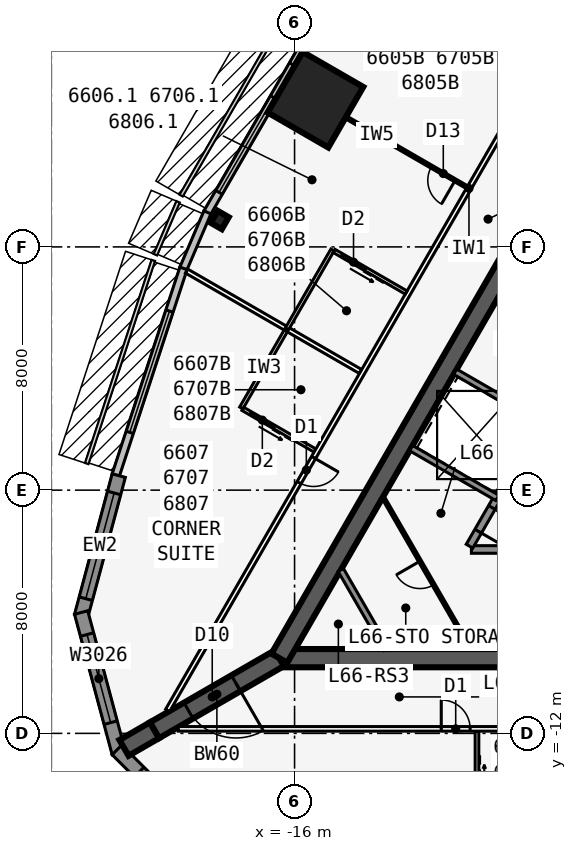
"""IFC4 building model, lengths in metres.
Left out: names, types, materials, properties, quantities, classifications, styles, units other than length and angle.
Written with IfcOpenShell. Run it as: python <this file> out.ifc"""

import sys

from ifc_helpers import new_model, si_unit, direction, frame, frame_2d, origin, origin_2d, place, context, subcontext, project, spatial, polyline, rectangle, i_section, outline, extrude, element, fill, save


model = new_model("IFC4")
c1 = context("Model", 3, precision=1e-05, world=origin(), true_north=direction((0.0, 1.0)))
c2 = subcontext(c1, "Body", "Model", "MODEL_VIEW")
j1 = project(units=[si_unit("LENGTHUNIT", "METRE"), si_unit("PLANEANGLEUNIT", "RADIAN")], contexts=[c1])
p1 = place(None, origin())
s1 = spatial("IfcSite", under=j1, at=p1, CompositionType="ELEMENT")
p2 = place(p1, origin())
s2 = spatial("IfcBuilding", under=s1, at=p2, CompositionType="ELEMENT")
p3 = place(p2, frame((0.0, 0.0, 250.1)))
s3 = spatial("IfcBuildingStorey", under=s2, at=p3, CompositionType="ELEMENT", Elevation=250.1)
p4 = place(p3, frame((-16.5, -9.526, 0.0), z_axis=(0.0, 0.0, 1.0), x_axis=(1.0, 0.0, 0.0)))
e1 = element("IfcWall", 1, at=p4, inside=s3, PredefinedType="SHEAR", context=c2, shape_type="SweptSolid", body=[
    extrude(rectangle(XDim=33.0, YDim=0.6, at=frame_2d((16.5, 0.0))), origin(), (0.0, 0.0, 1.0), 3.6),
])
p5 = place(p4, frame((14.05, 0.0, 0.0)))
e2 = element("IfcOpeningElement", 2, at=p5, cuts=e1, PredefinedType="OPENING", context=c2, shape_type="SweptSolid", body=[
    extrude(rectangle(XDim=1.8, YDim=2.13, at=frame_2d((0.9, 1.065))), frame((0.0, 0.31, 0.0), z_axis=(0.0, -1.0, 0.0), x_axis=(1.0, 0.0, 0.0)), (0.0, 0.0, 1.0), 0.62),
])
p6 = place(p3, frame((-10.183, -5.951, 0.0), z_axis=(0.0, 0.0, 1.0), x_axis=(1.0, 0.0, 0.0)))
e3 = element("IfcWall", 3, at=p6, inside=s3, PredefinedType="SOLIDWALL", context=c2, shape_type="SweptSolid", body=[
    extrude(rectangle(XDim=7.633, YDim=0.25, at=frame_2d((3.816, 0.0))), origin(), (0.0, 0.0, 1.0), 3.435),
])
p7 = place(p3, frame((0.0, 19.052, 0.0), z_axis=(0.0, 0.0, 1.0), x_axis=(-0.499999749417, -0.866025548458, 0.0)))
e4 = element("IfcWall", 4, at=p7, inside=s3, PredefinedType="SHEAR", context=c2, shape_type="SweptSolid", body=[
    extrude(rectangle(XDim=33.0, YDim=0.6, at=frame_2d((16.5, 0.0))), origin(), (0.0, 0.0, 1.0), 3.6),
])
p8 = place(p7, frame((14.15, 0.0, 0.0)))
e5 = element("IfcOpeningElement", 5, at=p8, cuts=e4, PredefinedType="OPENING", context=c2, shape_type="SweptSolid", body=[
    extrude(rectangle(XDim=1.8, YDim=2.13, at=frame_2d((0.9, 1.065))), frame((0.0, 0.31, 0.0), z_axis=(0.0, -1.0, 0.0), x_axis=(1.0, 0.0, 0.0)), (0.0, 0.0, 1.0), 0.62),
])
p9 = place(p7, frame((12.6, 0.0, 0.0)))
e6 = element("IfcOpeningElement", 6, at=p9, cuts=e4, PredefinedType="OPENING", context=c2, shape_type="SweptSolid", body=[
    extrude(rectangle(XDim=1.0, YDim=2.13, at=frame_2d((0.5, 1.065))), frame((0.0, 0.31, 0.0), z_axis=(0.0, -1.0, 0.0), x_axis=(1.0, 0.0, 0.0)), (0.0, 0.0, 1.0), 0.62),
])
p10 = place(p3, frame((-4.929, 3.365, 0.0), z_axis=(0.0, 0.0, 1.0), x_axis=(-0.499991433582, -0.866030349552, 0.0)))
e7 = element("IfcWall", 7, at=p10, inside=s3, PredefinedType="SOLIDWALL", context=c2, shape_type="SweptSolid", body=[
    extrude(rectangle(XDim=10.633, YDim=0.25, at=frame_2d((5.316, 0.0))), origin(), (0.0, 0.0, 1.0), 3.435),
])
p11 = place(p10, frame((9.164, 0.0, 0.0)))
e8 = element("IfcOpeningElement", 8, at=p11, cuts=e7, PredefinedType="OPENING", context=c2, shape_type="SweptSolid", body=[
    extrude(rectangle(XDim=0.9, YDim=2.13, at=frame_2d((0.45, 1.065))), frame((0.0, 0.135, 0.0), z_axis=(0.0, -1.0, 0.0), x_axis=(1.0, 0.0, 0.0)), (0.0, 0.0, 1.0), 0.27),
])
p12 = place(p10, frame((1.1, 0.0, 0.0)))
e9 = element("IfcOpeningElement", 9, at=p12, cuts=e7, PredefinedType="OPENING", context=c2, shape_type="SweptSolid", body=[
    extrude(rectangle(XDim=0.9, YDim=2.13, at=frame_2d((0.45, 1.065))), frame((0.0, 0.135, 0.0), z_axis=(0.0, -1.0, 0.0), x_axis=(1.0, 0.0, 0.0)), (0.0, 0.0, 1.0), 0.27),
])
p13 = place(p10, frame((4.0, 0.0, 0.0)))
e10 = element("IfcOpeningElement", 10, at=p13, cuts=e7, PredefinedType="OPENING", context=c2, shape_type="SweptSolid", body=[
    extrude(rectangle(XDim=0.9, YDim=2.13, at=frame_2d((0.45, 1.065))), frame((0.0, 0.135, 0.0), z_axis=(0.0, -1.0, 0.0), x_axis=(1.0, 0.0, 0.0)), (0.0, 0.0, 1.0), 0.27),
])
for number, where, z_axis, x_axis in (
    (11, (-7.879, -1.744, 0.0), (0.0, 0.0, 1.0), (-0.866, 0.5, 0.0)),
    (12, (-9.329, -4.256, 0.0), (0.0, 0.0, 1.0), (-0.866, 0.5, 0.0)),
):
    element("IfcWall", number, at=place(p3, frame(where, z_axis=z_axis, x_axis=x_axis)), inside=s3, PredefinedType="SOLIDWALL", context=c2, shape_type="SweptSolid", body=[
        extrude(rectangle(XDim=3.275, YDim=0.2, at=frame_2d((1.637, 0.0))), origin(), (0.0, 0.0, 1.0), 3.435),
    ])
p14 = place(p3, frame((-16.5, -9.526, 0.0), z_axis=(0.0, 0.0, 1.0), x_axis=(-0.866031398331, -0.499989616998, 0.0)))
e13 = element("IfcWall", 13, at=p14, inside=s3, PredefinedType="SHEAR", context=c2, shape_type="SweptSolid", body=[
    extrude(rectangle(XDim=4.746, YDim=0.6, at=frame_2d((2.373, 0.0))), origin(), (0.0, 0.0, 1.0), 3.6),
])
p15 = place(p14, frame((1.65, 0.0, 0.0)))
e14 = element("IfcOpeningElement", 14, at=p15, cuts=e13, PredefinedType="OPENING", context=c2, shape_type="SweptSolid", body=[
    extrude(rectangle(XDim=1.8, YDim=2.13, at=frame_2d((0.9, 1.065))), frame((0.0, 0.31, 0.0), z_axis=(0.0, -1.0, 0.0), x_axis=(1.0, 0.0, 0.0)), (0.0, 0.0, 1.0), 0.62),
])
p16 = place(p3, frame((-20.61, -11.899, 0.0), z_axis=(0.0, 0.0, 1.0), x_axis=(-0.866009537788, -0.500027479704, 0.0)))
e15 = element("IfcWall", 15, at=p16, inside=s3, PredefinedType="SHEAR", context=c2, shape_type="SweptSolid", body=[
    extrude(rectangle(XDim=1.155, YDim=0.6, at=frame_2d((0.577, 0.0))), origin(), (0.0, 0.0, 1.0), 3.6),
])
p17 = place(p3, frame((-18.461, 4.885, 0.0), z_axis=(0.0, 0.0, 1.0), x_axis=(-0.866025403784, 0.5, 0.0)))
e16 = element("IfcColumn", 16, at=p17, inside=s3, PredefinedType="COLUMN", context=c2, shape_type="SweptSolid", body=[
    extrude(i_section(OverallWidth=0.419, OverallDepth=0.455, WebThickness=0.042, FlangeThickness=0.068, at=origin_2d()), origin(), (0.0, 0.0, 1.0), 3.6),
])
p18 = place(p3, frame((-15.312, 8.84, 0.0), z_axis=(0.0, 0.0, 1.0), x_axis=(-0.866025403784, 0.5, 0.0)))
e17 = element("IfcColumn", 17, at=p18, inside=s3, PredefinedType="COLUMN", context=c2, shape_type="SweptSolid", body=[
    extrude(rectangle(XDim=2.3, YDim=2.3, at=origin_2d()), origin(), (0.0, 0.0, 1.0), 3.6),
])
p19 = place(p3, frame((-13.873, 13.783, 0.0), z_axis=(0.0, 0.0, 1.0), x_axis=(-0.499993662806, -0.866029062534, 0.0)))
e18 = element("IfcWall", 18, at=p19, inside=s3, PredefinedType="STANDARD", context=c2, shape_type="SweptSolid", body=[
    extrude(rectangle(XDim=10.0, YDim=0.25, at=frame_2d((5.0, 0.0))), origin(), (0.0, 0.0, 1.0), 3.435),
])
p20 = place(p19, frame((0.775, 0.0, 0.45)))
e19 = element("IfcOpeningElement", 19, at=p20, cuts=e18, PredefinedType="OPENING", context=c2, shape_type="SweptSolid", body=[
    extrude(rectangle(XDim=3.6, YDim=2.6, at=frame_2d((1.8, 1.3))), frame((0.0, 0.135, 0.0), z_axis=(0.0, -1.0, 0.0), x_axis=(1.0, 0.0, 0.0)), (0.0, 0.0, 1.0), 0.27),
])
p21 = place(p19, frame((5.625, 0.0, 0.45)))
e20 = element("IfcOpeningElement", 20, at=p21, cuts=e18, PredefinedType="OPENING", context=c2, shape_type="SweptSolid", body=[
    extrude(rectangle(XDim=3.6, YDim=2.6, at=frame_2d((1.8, 1.3))), frame((0.0, 0.135, 0.0), z_axis=(0.0, -1.0, 0.0), x_axis=(1.0, 0.0, 0.0)), (0.0, 0.0, 1.0), 0.27),
])
p22 = place(p3, frame((-18.866, 5.136, 0.0), z_axis=(0.0, 0.0, 1.0), x_axis=(-0.393290226175, -0.91941437774, 0.0)))
e21 = element("IfcWall", 21, at=p22, inside=s3, PredefinedType="STANDARD", context=c2, shape_type="SweptSolid", body=[
    extrude(rectangle(XDim=2.014, YDim=0.25, at=frame_2d((1.007, 0.0))), origin(), (0.0, 0.0, 1.0), 3.435),
])
p23 = place(p3, frame((-19.654, 3.294, 0.0), z_axis=(0.0, 0.0, 1.0), x_axis=(-0.311328857048, -0.95030223759, 0.0)))
e22 = element("IfcWall", 22, at=p23, inside=s3, PredefinedType="STANDARD", context=c2, shape_type="SweptSolid", body=[
    extrude(rectangle(XDim=7.153, YDim=0.25, at=frame_2d((3.576, 0.0))), origin(), (0.0, 0.0, 1.0), 3.435),
])
p24 = place(p23, frame((1.476, 0.0, 0.45)))
e23 = element("IfcOpeningElement", 23, at=p24, cuts=e22, PredefinedType="OPENING", context=c2, shape_type="SweptSolid", body=[
    extrude(rectangle(XDim=4.2, YDim=2.6, at=frame_2d((2.1, 1.3))), frame((0.0, 0.135, 0.0), z_axis=(0.0, -1.0, 0.0), x_axis=(1.0, 0.0, 0.0)), (0.0, 0.0, 1.0), 0.27),
])
p25 = place(p3, frame((-21.783, -3.522, 0.0), z_axis=(0.0, 0.0, 1.0), x_axis=(-0.25880328844, -0.965930048136, 0.0)))
e24 = element("IfcWall", 24, at=p25, inside=s3, PredefinedType="SOLIDWALL", context=c2, shape_type="SweptSolid", body=[
    extrude(rectangle(XDim=4.782, YDim=0.45, at=frame_2d((2.391, 0.0))), origin(), (0.0, 0.0, 1.0), 3.435),
])
p26 = place(p25, frame((0.591, 0.0, 0.45)))
e25 = element("IfcOpeningElement", 25, at=p26, cuts=e24, PredefinedType="OPENING", context=c2, shape_type="SweptSolid", body=[
    extrude(rectangle(XDim=3.6, YDim=2.6, at=frame_2d((1.8, 1.3))), frame((0.0, 0.235, 0.0), z_axis=(0.0, -1.0, 0.0), x_axis=(1.0, 0.0, 0.0)), (0.0, 0.0, 1.0), 0.47),
])
p27 = place(p3, frame((-23.02, -8.025, 0.0), z_axis=(0.0, 0.0, 1.0), x_axis=(0.25880328844, -0.965930048136, 0.0)))
e26 = element("IfcWall", 26, at=p27, inside=s3, PredefinedType="SOLIDWALL", context=c2, shape_type="SweptSolid", body=[
    extrude(outline(polyline([(4.782, 0.225), (4.722, 0.225), (4.375, 0.132), (4.351, 0.225), (0.0, 0.225), (0.0, -0.225), (4.782, -0.225), (4.782, 0.225)])), origin(), (0.0, 0.0, 1.0), 3.435),
])
p28 = place(p27, frame((0.75, 0.0, 0.45)))
e27 = element("IfcOpeningElement", 27, at=p28, cuts=e26, PredefinedType="OPENING", context=c2, shape_type="SweptSolid", body=[
    extrude(rectangle(XDim=3.0, YDim=2.6, at=frame_2d((1.5, 1.3))), frame((0.0, 0.235, 0.0), z_axis=(0.0, -1.0, 0.0), x_axis=(1.0, 0.0, 0.0)), (0.0, 0.0, 1.0), 0.47),
])
p29 = place(p3, frame((-21.841, -12.542, 0.0), z_axis=(0.0, 0.0, 1.0), x_axis=(0.707081252484, -0.707132308968, 0.0)))
e28 = element("IfcWall", 28, at=p29, inside=s3, PredefinedType="SOLIDWALL", context=c2, shape_type="SweptSolid", body=[
    extrude(outline(polyline([(4.782, 0.225), (0.431, 0.225), (0.406, 0.132), (0.059, 0.225), (0.0, 0.225), (0.0, -0.225), (4.782, -0.225), (4.782, 0.225)])), origin(), (0.0, 0.0, 1.0), 3.435),
])
p30 = place(p29, frame((1.031, 0.0, 0.45)))
e29 = element("IfcOpeningElement", 29, at=p30, cuts=e28, PredefinedType="OPENING", context=c2, shape_type="SweptSolid", body=[
    extrude(rectangle(XDim=3.0, YDim=2.6, at=frame_2d((1.5, 1.3))), frame((0.0, 0.235, 0.0), z_axis=(0.0, -1.0, 0.0), x_axis=(1.0, 0.0, 0.0)), (0.0, 0.0, 1.0), 0.47),
])
p31 = place(p3, frame((-19.827, -11.851, 0.0), z_axis=(0.0, 0.0, 1.0), x_axis=(1.0, 0.0, 0.0)))
e30 = element("IfcWall", 30, at=p31, inside=s3, PredefinedType="PARTITIONING", context=c2, shape_type="SweptSolid", body=[
    extrude(rectangle(XDim=12.827, YDim=0.15, at=frame_2d((6.414, 0.0))), origin(), (0.0, 0.0, 1.0), 3.435),
])
p32 = place(p31, frame((8.652, 0.0, 0.0)))
e31 = element("IfcOpeningElement", 31, at=p32, cuts=e30, PredefinedType="OPENING", context=c2, shape_type="SweptSolid", body=[
    extrude(rectangle(XDim=0.95, YDim=2.13, at=frame_2d((0.475, 1.065))), frame((0.0, 0.085, 0.0), z_axis=(0.0, -1.0, 0.0), x_axis=(1.0, 0.0, 0.0)), (0.0, 0.0, 1.0), 0.17),
])
p33 = place(p3, frame((-10.0, -11.926, 0.0), z_axis=(0.0, 0.0, 1.0), x_axis=(0.0, -1.0, 0.0)))
e32 = element("IfcWall", 32, at=p33, inside=s3, PredefinedType="PLUMBINGWALL", context=c2, shape_type="SweptSolid", body=[
    extrude(rectangle(XDim=2.74, YDim=0.12, at=frame_2d((1.37, 0.0))), origin(), (0.0, 0.0, 1.0), 3.435),
])
p34 = place(p33, frame((1.55, 0.0, 0.0)))
e33 = element("IfcOpeningElement", 33, at=p34, cuts=e32, PredefinedType="OPENING", context=c2, shape_type="SweptSolid", body=[
    extrude(rectangle(XDim=0.9, YDim=2.13, at=frame_2d((0.45, 1.065))), frame((0.0, 0.07, 0.0), z_axis=(0.0, -1.0, 0.0), x_axis=(1.0, 0.0, 0.0)), (0.0, 0.0, 1.0), 0.14),
])
p35 = place(p3, frame((-0.35, 23.096, 0.0), z_axis=(0.0, 0.0, 1.0), x_axis=(-0.499998875317, -0.866026053119, 0.0)))
e34 = element("IfcWall", 34, at=p35, inside=s3, PredefinedType="PARTITIONING", context=c2, shape_type="SweptSolid", body=[
    extrude(rectangle(XDim=39.654, YDim=0.15, at=frame_2d((19.827, 0.0))), origin(), (0.0, 0.0, 1.0), 3.435),
])
p36 = place(p35, frame((8.652, 0.0, 0.0)))
e35 = element("IfcOpeningElement", 35, at=p36, cuts=e34, PredefinedType="OPENING", context=c2, shape_type="SweptSolid", body=[
    extrude(rectangle(XDim=0.95, YDim=2.13, at=frame_2d((0.475, 1.065))), frame((0.0, 0.085, 0.0), z_axis=(0.0, -1.0, 0.0), x_axis=(1.0, 0.0, 0.0)), (0.0, 0.0, 1.0), 0.17),
])
p37 = place(p35, frame((15.852, 0.0, 0.0)))
e36 = element("IfcOpeningElement", 36, at=p37, cuts=e34, PredefinedType="OPENING", context=c2, shape_type="SweptSolid", body=[
    extrude(rectangle(XDim=0.95, YDim=2.13, at=frame_2d((0.475, 1.065))), frame((0.0, 0.085, 0.0), z_axis=(0.0, -1.0, 0.0), x_axis=(1.0, 0.0, 0.0)), (0.0, 0.0, 1.0), 0.17),
])
p38 = place(p35, frame((30.052, 0.0, 0.0)))
e37 = element("IfcOpeningElement", 37, at=p38, cuts=e34, PredefinedType="OPENING", context=c2, shape_type="SweptSolid", body=[
    extrude(rectangle(XDim=0.95, YDim=2.13, at=frame_2d((0.475, 1.065))), frame((0.0, 0.085, 0.0), z_axis=(0.0, -1.0, 0.0), x_axis=(1.0, 0.0, 0.0)), (0.0, 0.0, 1.0), 0.17),
])
p39 = place(p3, frame((-10.329, 5.963, 0.0), z_axis=(0.0, 0.0, 1.0), x_axis=(-0.866011785882, 0.500023586156, 0.0)))
e38 = element("IfcWall", 38, at=p39, inside=s3, PredefinedType="PARTITIONING", context=c2, shape_type="SweptSolid", body=[
    extrude(rectangle(XDim=6.854, YDim=0.1, at=frame_2d((3.427, 0.0))), origin(), (0.0, 0.0, 1.0), 2.678),
])
p40 = place(p39, frame((0.45, 0.0, 0.0)))
e39 = element("IfcOpeningElement", 39, at=p40, cuts=e38, PredefinedType="OPENING", context=c2, shape_type="SweptSolid", body=[
    extrude(rectangle(XDim=0.9, YDim=2.13, at=frame_2d((0.45, 1.065))), frame((0.0, 0.06, 0.0), z_axis=(0.0, -1.0, 0.0), x_axis=(1.0, 0.0, 0.0)), (0.0, 0.0, 1.0), 0.12),
])
p41 = place(p3, frame((-13.829, -0.099, 0.0), z_axis=(0.0, 0.0, 1.0), x_axis=(-0.866022562216, 0.500004921708, 0.0)))
e40 = element("IfcWall", 40, at=p41, inside=s3, PredefinedType="PARTITIONING", context=c2, shape_type="SweptSolid", body=[
    extrude(rectangle(XDim=6.609, YDim=0.15, at=frame_2d((3.304, 0.0))), origin(), (0.0, 0.0, 1.0), 2.678),
])
p42 = place(p3, frame((-14.753, 3.899, 0.0), z_axis=(0.0, 0.0, 1.0), x_axis=(-0.50002537861, -0.866010750942, 0.0)))
e41 = element("IfcWall", 41, at=p42, inside=s3, PredefinedType="PLUMBINGWALL", context=c2, shape_type="SweptSolid", body=[
    extrude(rectangle(XDim=3.0, YDim=0.12, at=frame_2d((1.5, 0.0))), origin(), (0.0, 0.0, 1.0), 3.435),
])
p43 = place(p3, frame((-12.329, 2.499, 0.0), z_axis=(0.0, 0.0, 1.0), x_axis=(-0.866035715982, 0.499982138324, 0.0)))
e42 = element("IfcWall", 42, at=p43, inside=s3, PredefinedType="PLUMBINGWALL", context=c2, shape_type="SweptSolid", body=[
    extrude(rectangle(XDim=2.74, YDim=0.12, at=frame_2d((1.37, 0.0))), origin(), (0.0, 0.0, 1.0), 3.435),
])
p44 = place(p43, frame((1.55, 0.0, 0.0)))
e43 = element("IfcOpeningElement", 43, at=p44, cuts=e42, PredefinedType="OPENING", context=c2, shape_type="SweptSolid", body=[
    extrude(rectangle(XDim=0.9, YDim=2.13, at=frame_2d((0.45, 1.065))), frame((0.0, 0.07, 0.0), z_axis=(0.0, -1.0, 0.0), x_axis=(1.0, 0.0, 0.0)), (0.0, 0.0, 1.0), 0.14),
])
p45 = place(p3, frame((-16.253, 1.301, 0.0), z_axis=(0.0, 0.0, 1.0), x_axis=(-0.499990139034, -0.866031096941, 0.0)))
e44 = element("IfcWall", 44, at=p45, inside=s3, PredefinedType="PLUMBINGWALL", context=c2, shape_type="SweptSolid", body=[
    extrude(rectangle(XDim=3.0, YDim=0.12, at=frame_2d((1.5, 0.0))), origin(), (0.0, 0.0, 1.0), 3.435),
])
p46 = place(p3, frame((-15.329, -2.697, 0.0), z_axis=(0.0, 0.0, 1.0), x_axis=(-0.866035715982, 0.499982138324, 0.0)))
e45 = element("IfcWall", 45, at=p46, inside=s3, PredefinedType="PLUMBINGWALL", context=c2, shape_type="SweptSolid", body=[
    extrude(rectangle(XDim=2.74, YDim=0.12, at=frame_2d((1.37, 0.0))), origin(), (0.0, 0.0, 1.0), 3.435),
])
p47 = place(p46, frame((1.55, 0.0, 0.0)))
e46 = element("IfcOpeningElement", 46, at=p47, cuts=e45, PredefinedType="OPENING", context=c2, shape_type="SweptSolid", body=[
    extrude(rectangle(XDim=0.9, YDim=2.13, at=frame_2d((0.45, 1.065))), frame((0.0, 0.07, 0.0), z_axis=(0.0, -1.0, 0.0), x_axis=(1.0, 0.0, 0.0)), (0.0, 0.0, 1.0), 0.14),
])
p48 = place(p3, frame((-12.978, -9.226, 0.0), z_axis=(0.0, 0.0, 1.0), x_axis=(-0.499952404951, 0.866052881055, 0.0)))
e47 = element("IfcWall", 47, at=p48, inside=s3, PredefinedType="SOLIDWALL", context=c2, shape_type="SweptSolid", body=[
    extrude(rectangle(XDim=3.002, YDim=0.2, at=frame_2d((1.501, 0.0))), origin(), (0.0, 0.0, 1.0), 3.435),
])
p49 = place(p3, frame((-10.207, -9.226, 0.0), z_axis=(0.0, 0.0, 1.0), x_axis=(-0.500027479704, 0.866009537788, 0.0)))
e48 = element("IfcWall", 48, at=p49, inside=s3, PredefinedType="PARTITIONING", context=c2, shape_type="SweptSolid", body=[
    extrude(rectangle(XDim=5.774, YDim=0.1, at=frame_2d((2.887, 0.0))), origin(), (0.0, 0.0, 1.0), 3.435),
])
p50 = place(p49, frame((2.437, 0.0, 0.0)))
e49 = element("IfcOpeningElement", 49, at=p50, cuts=e48, PredefinedType="OPENING", context=c2, shape_type="SweptSolid", body=[
    extrude(rectangle(XDim=0.9, YDim=2.13, at=frame_2d((0.45, 1.065))), frame((0.0, 0.06, 0.0), z_axis=(0.0, -1.0, 0.0), x_axis=(1.0, 0.0, 0.0)), (0.0, 0.0, 1.0), 0.12),
])
p51 = place(p20, origin())
e50 = element("IfcWindow", 50, at=p51, inside=s3, PartitioningType="SINGLE_PANEL", PredefinedType="WINDOW", context=c2, shape_type="SweptSolid", body=[
    extrude(rectangle(XDim=3.6, YDim=2.6, at=frame_2d((1.8, 1.3))), frame((0.0, 0.03, 0.0), z_axis=(0.0, -1.0, 0.0), x_axis=(1.0, 0.0, 0.0)), (0.0, 0.0, 1.0), 0.06),
])
fill(e19, e50)
p52 = place(p21, origin())
e51 = element("IfcWindow", 51, at=p52, inside=s3, PartitioningType="SINGLE_PANEL", PredefinedType="WINDOW", context=c2, shape_type="SweptSolid", body=[
    extrude(rectangle(XDim=3.6, YDim=2.6, at=frame_2d((1.8, 1.3))), frame((0.0, 0.03, 0.0), z_axis=(0.0, -1.0, 0.0), x_axis=(1.0, 0.0, 0.0)), (0.0, 0.0, 1.0), 0.06),
])
fill(e20, e51)
p53 = place(p24, origin())
e52 = element("IfcWindow", 52, at=p53, inside=s3, PartitioningType="SINGLE_PANEL", PredefinedType="WINDOW", context=c2, shape_type="SweptSolid", body=[
    extrude(rectangle(XDim=4.2, YDim=2.6, at=frame_2d((2.1, 1.3))), frame((0.0, 0.03, 0.0), z_axis=(0.0, -1.0, 0.0), x_axis=(1.0, 0.0, 0.0)), (0.0, 0.0, 1.0), 0.06),
])
fill(e23, e52)
p54 = place(p26, origin())
e53 = element("IfcWindow", 53, at=p54, inside=s3, PartitioningType="SINGLE_PANEL", PredefinedType="WINDOW", context=c2, shape_type="SweptSolid", body=[
    extrude(rectangle(XDim=3.6, YDim=2.6, at=frame_2d((1.8, 1.3))), frame((0.0, 0.03, 0.0), z_axis=(0.0, -1.0, 0.0), x_axis=(1.0, 0.0, 0.0)), (0.0, 0.0, 1.0), 0.06),
])
fill(e25, e53)
p55 = place(p28, origin())
e54 = element("IfcWindow", 54, at=p55, inside=s3, PartitioningType="SINGLE_PANEL", PredefinedType="WINDOW", context=c2, shape_type="SweptSolid", body=[
    extrude(rectangle(XDim=3.0, YDim=2.6, at=frame_2d((1.5, 1.3))), frame((0.0, 0.03, 0.0), z_axis=(0.0, -1.0, 0.0), x_axis=(1.0, 0.0, 0.0)), (0.0, 0.0, 1.0), 0.06),
])
fill(e27, e54)
p56 = place(p30, origin())
e55 = element("IfcWindow", 55, at=p56, inside=s3, PartitioningType="SINGLE_PANEL", PredefinedType="WINDOW", context=c2, shape_type="SweptSolid", body=[
    extrude(rectangle(XDim=3.0, YDim=2.6, at=frame_2d((1.5, 1.3))), frame((0.0, 0.03, 0.0), z_axis=(0.0, -1.0, 0.0), x_axis=(1.0, 0.0, 0.0)), (0.0, 0.0, 1.0), 0.06),
])
fill(e29, e55)
p57 = place(p32, origin())
e56 = element("IfcDoor", 56, at=p57, inside=s3, OperationType="SINGLE_SWING_LEFT", PredefinedType="DOOR", context=c2, shape_type="SweptSolid", body=[
    extrude(rectangle(XDim=0.95, YDim=2.13, at=frame_2d((0.475, 1.065))), frame((0.0, 0.025, 0.0), z_axis=(0.0, -1.0, 0.0), x_axis=(1.0, 0.0, 0.0)), (0.0, 0.0, 1.0), 0.05),
])
fill(e31, e56)
p58 = place(p40, origin())
e57 = element("IfcDoor", 57, at=p58, inside=s3, OperationType="SINGLE_SWING_LEFT", PredefinedType="DOOR", context=c2, shape_type="SweptSolid", body=[
    extrude(rectangle(XDim=0.9, YDim=2.13, at=frame_2d((0.45, 1.065))), frame((0.0, 0.025, 0.0), z_axis=(0.0, -1.0, 0.0), x_axis=(1.0, 0.0, 0.0)), (0.0, 0.0, 1.0), 0.05),
])
fill(e39, e57)
p59 = place(p44, origin())
e58 = element("IfcDoor", 58, at=p59, inside=s3, OperationType="SLIDING_TO_LEFT", PredefinedType="DOOR", context=c2, shape_type="SweptSolid", body=[
    extrude(rectangle(XDim=0.9, YDim=2.13, at=frame_2d((0.45, 1.065))), frame((0.0, 0.025, 0.0), z_axis=(0.0, -1.0, 0.0), x_axis=(1.0, 0.0, 0.0)), (0.0, 0.0, 1.0), 0.05),
])
fill(e43, e58)
p60 = place(p47, origin())
e59 = element("IfcDoor", 59, at=p60, inside=s3, OperationType="SLIDING_TO_LEFT", PredefinedType="DOOR", context=c2, shape_type="SweptSolid", body=[
    extrude(rectangle(XDim=0.9, YDim=2.13, at=frame_2d((0.45, 1.065))), frame((0.0, 0.025, 0.0), z_axis=(0.0, -1.0, 0.0), x_axis=(1.0, 0.0, 0.0)), (0.0, 0.0, 1.0), 0.05),
])
fill(e46, e59)
p61 = place(p38, origin())
e60 = element("IfcDoor", 60, at=p61, inside=s3, OperationType="SINGLE_SWING_LEFT", PredefinedType="DOOR", context=c2, shape_type="SweptSolid", body=[
    extrude(rectangle(XDim=0.95, YDim=2.13, at=frame_2d((0.475, 1.065))), frame((0.0, 0.025, 0.0), z_axis=(0.0, -1.0, 0.0), x_axis=(1.0, 0.0, 0.0)), (0.0, 0.0, 1.0), 0.05),
])
fill(e37, e60)
p62 = place(p15, origin())
e61 = element("IfcDoor", 61, at=p62, inside=s3, OperationType="DOUBLE_DOOR_DOUBLE_SWING", PredefinedType="DOOR", context=c2, shape_type="SweptSolid", body=[
    extrude(rectangle(XDim=1.8, YDim=2.13, at=frame_2d((0.9, 1.065))), frame((0.0, 0.025, 0.0), z_axis=(0.0, -1.0, 0.0), x_axis=(1.0, 0.0, 0.0)), (0.0, 0.0, 1.0), 0.05),
])
fill(e14, e61)
p63 = place(p50, origin())
e62 = element("IfcDoor", 62, at=p63, inside=s3, OperationType="SINGLE_SWING_RIGHT", PredefinedType="DOOR", context=c2, shape_type="SweptSolid", body=[
    extrude(rectangle(XDim=0.9, YDim=2.13, at=frame_2d((0.45, 1.065))), frame((0.0, 0.025, 0.0), z_axis=(0.0, -1.0, 0.0), x_axis=(1.0, 0.0, 0.0)), (0.0, 0.0, 1.0), 0.05),
])
fill(e49, e62)
p64 = place(p11, origin())
e63 = element("IfcDoor", 63, at=p64, inside=s3, OperationType="SINGLE_SWING_RIGHT", PredefinedType="DOOR", context=c2, shape_type="SweptSolid", body=[
    extrude(rectangle(XDim=0.9, YDim=2.13, at=frame_2d((0.45, 1.065))), frame((0.0, 0.025, 0.0), z_axis=(0.0, -1.0, 0.0), x_axis=(1.0, 0.0, 0.0)), (0.0, 0.0, 1.0), 0.05),
])
fill(e8, e63)
save(model, sys.argv[1])
